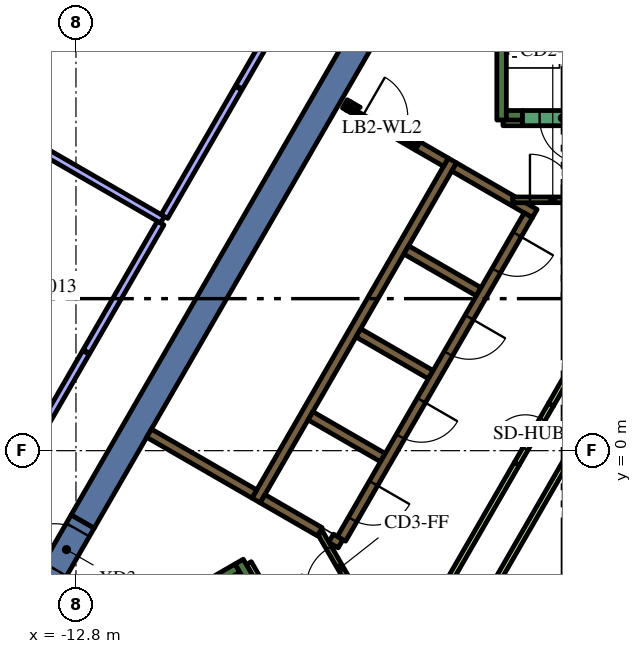
"""IFC4 building model, lengths in metres.
Left out: names, types, materials, properties, quantities, classifications, styles, units other than length and angle.
Written with IfcOpenShell. Run it as: python <this file> out.ifc"""

import sys

from ifc_helpers import new_model, si_unit, direction, frame, frame_2d, origin, place, context, subcontext, project, spatial, polyline, rectangle, outline, extrude, element, fill, save


model = new_model("IFC4")
c1 = context("Model", 3, precision=1e-05, world=origin(), true_north=direction((0.0, 1.0)))
c2 = subcontext(c1, "Body", "Model", "MODEL_VIEW")
j1 = project(units=[si_unit("LENGTHUNIT", "METRE"), si_unit("PLANEANGLEUNIT", "RADIAN")], contexts=[c1])
p1 = place(None, origin())
s1 = spatial("IfcSite", under=j1, at=p1, CompositionType="ELEMENT")
p2 = place(p1, origin())
s2 = spatial("IfcBuilding", under=s1, at=p2, CompositionType="ELEMENT")
p3 = place(p2, frame((0.0, 0.0, 222.6)))
s3 = spatial("IfcBuildingStorey", under=s2, at=p3, CompositionType="ELEMENT", Elevation=222.6)
p4 = place(p3, frame((-13.475, -3.339, 0.0), z_axis=(0.0, 0.0, 1.0), x_axis=(-0.499944726303, -0.866057313716, 0.0)))
e1 = element("IfcWall", 1, at=p4, inside=s3, PredefinedType="SOLIDWALL", context=c2, shape_type="SweptSolid", body=[
    extrude(rectangle(XDim=2.884, YDim=0.7, at=frame_2d((1.442, 0.0))), origin(), (0.0, 0.0, 1.0), 4.2),
])
p5 = place(p3, frame((-12.625, -1.867, 0.0), z_axis=(0.0, 0.0, 1.0), x_axis=(0.500008520515, 0.866020484407, 0.0)))
e2 = element("IfcWall", 2, at=p5, inside=s3, PredefinedType="SOLIDWALL", context=c2, shape_type="SweptSolid", body=[
    extrude(rectangle(XDim=15.859, YDim=0.7, at=frame_2d((7.929, 0.0))), origin(), (0.0, 0.0, 1.0), 4.2),
])
p6 = place(p3, frame((-1.6, 8.7, 0.0), z_axis=(0.0, 0.0, 1.0), x_axis=(0.0, 1.0, 0.0)))
e3 = element("IfcWall", 3, at=p6, inside=s3, PredefinedType="SOLIDWALL", context=c2, shape_type="SweptSolid", body=[
    extrude(rectangle(XDim=7.05, YDim=0.25, at=frame_2d((3.525, 0.0))), origin(), (0.0, 0.0, 1.0), 4.2),
])
p7 = place(p3, frame((-1.475, 8.825, 0.0), z_axis=(0.0, 0.0, 1.0), x_axis=(1.0, 0.0, 0.0)))
e4 = element("IfcWall", 4, at=p7, inside=s3, PredefinedType="SOLIDWALL", context=c2, shape_type="SweptSolid", body=[
    extrude(rectangle(XDim=0.425, YDim=0.25, at=frame_2d((0.212, 0.0))), origin(), (0.0, 0.0, 1.0), 4.2),
])
p8 = place(p3, frame((-14.44, -6.49, 0.0), z_axis=(0.0, 0.0, 1.0), x_axis=(0.866022966069, 0.500004222222, 0.0)))
e5 = element("IfcWall", 5, at=p8, inside=s3, PredefinedType="SOLIDWALL", context=c2, shape_type="SweptSolid", body=[
    extrude(rectangle(XDim=6.8, YDim=0.25, at=frame_2d((3.4, 0.0))), origin(), (0.0, 0.0, 1.0), 4.2),
])
p9 = place(p3, frame((-8.168, -3.503, 0.0), z_axis=(0.0, 0.0, 1.0), x_axis=(-0.499952099219, 0.866053057547, 0.0)))
e6 = element("IfcWall", 6, at=p9, inside=s3, PredefinedType="SOLIDWALL", context=c2, shape_type="SweptSolid", body=[
    extrude(rectangle(XDim=0.675, YDim=0.25, at=frame_2d((0.337, 0.0))), origin(), (0.0, 0.0, 1.0), 4.2),
])
p10 = place(p3, frame((-8.06, -1.311, 0.0), z_axis=(0.0, 0.0, 1.0), x_axis=(0.50000273126, 0.866023826885, 0.0)))
e7 = element("IfcWall", 7, at=p10, inside=s3, PredefinedType="SOLIDWALL", context=c2, shape_type="SweptSolid", body=[
    extrude(rectangle(XDim=10.33, YDim=0.25, at=frame_2d((5.165, 0.0))), origin(), (0.0, 0.0, 1.0), 4.2),
])
p11 = place(p3, origin())
e8 = element("IfcWall", 8, at=p11, inside=s3, PredefinedType="SOLIDWALL", context=c2, shape_type="SweptSolid", body=[
    extrude(outline(polyline([(-2.912, 7.356), (-2.787, 7.573), (-1.232, 6.675), (-1.303, 6.675), (-1.304, 6.675), (-1.304, 6.675), (-1.304, 6.525), (-1.304, 6.525), (-1.303, 6.525), (-0.971, 6.525), (-0.665, 6.348), (-0.79, 6.132), (-1.007, 6.257), (-1.007, 6.257), (-2.912, 7.356)])), origin(), (0.0, 0.0, 1.0), 4.2),
])
for number, where, z_axis, x_axis in (
    (9, (-2.204, 4.182, 0.0), (0.0, 0.0, 1.0), (-0.866, 0.5, 0.0)),
    (10, (-5.369, 3.1, 0.0), (0.0, 0.0, 1.0), (0.866, -0.5, 0.0)),
    (11, (-4.724, -0.182, 0.0), (0.0, 0.0, 1.0), (-0.866, 0.5, 0.0)),
):
    element("IfcWall", number, at=place(p3, frame(where, z_axis=z_axis, x_axis=x_axis)), inside=s3, PredefinedType="SOLIDWALL", context=c2, shape_type="SweptSolid", body=[
        extrude(rectangle(XDim=2.2, YDim=0.25, at=frame_2d((1.1, 0.0))), origin(), (0.0, 0.0, 1.0), 4.2),
    ])
p12 = place(p3, frame((-6.088, -2.305, 0.0), z_axis=(0.0, 0.0, 1.0), x_axis=(0.866059450854, -0.499941024108, 0.0)))
e12 = element("IfcWall", 12, at=p12, inside=s3, PredefinedType="SOLIDWALL", context=c2, shape_type="SweptSolid", body=[
    extrude(rectangle(XDim=0.29, YDim=0.25, at=frame_2d((0.145, 0.0))), origin(), (0.0, 0.0, 1.0), 4.2),
])
p13 = place(p3, frame((-7.889, -1.265, 0.0), z_axis=(0.0, 0.0, 1.0), x_axis=(0.865986741702, -0.500066958712, 0.0)))
e13 = element("IfcWall", 13, at=p13, inside=s3, PredefinedType="SOLIDWALL", context=c2, shape_type="SweptSolid", body=[
    extrude(rectangle(XDim=1.738, YDim=0.25, at=frame_2d((0.869, 0.0))), origin(), (0.0, 0.0, 1.0), 4.2),
])
p14 = place(p3, frame((-8.106, -1.14, 0.0), z_axis=(0.0, 0.0, 1.0), x_axis=(-0.866008981251, 0.500028443584, 0.0)))
e14 = element("IfcWall", 14, at=p14, inside=s3, PredefinedType="SOLIDWALL", context=c2, shape_type="SweptSolid", body=[
    extrude(rectangle(XDim=3.2, YDim=0.25, at=frame_2d((1.6, 0.0))), origin(), (0.0, 0.0, 1.0), 4.2),
])
p15 = place(p3, frame((-5.725, 9.125, 0.0), z_axis=(0.0, 0.0, 1.0), x_axis=(0.866185586049, -0.49972245349, 0.0)))
e15 = element("IfcWall", 15, at=p15, inside=s3, PredefinedType="SOLIDWALL", context=c2, shape_type="SweptSolid", body=[
    extrude(rectangle(XDim=0.11, YDim=0.25, at=frame_2d((0.055, 0.0))), origin(), (0.0, 0.0, 1.0), 4.2),
])
p16 = place(p3, frame((-3.066, 7.59, 0.0), z_axis=(0.0, 0.0, 1.0), x_axis=(-0.866081358704, 0.49990307071, 0.0)))
e16 = element("IfcWall", 16, at=p16, inside=s3, PredefinedType="SOLIDWALL", context=c2, shape_type="SweptSolid", body=[
    extrude(rectangle(XDim=0.858, YDim=0.25, at=frame_2d((0.429, 0.0))), origin(), (0.0, 0.0, 1.0), 4.2),
])
e17 = element("IfcWall", 17, at=p11, inside=s3, PredefinedType="SOLIDWALL", context=c2, shape_type="SweptSolid", body=[
    extrude(outline(polyline([(-3.748, 8.128), (-3.813, 8.015), (-4.027, 8.139), (-4.017, 8.156), (-4.008, 8.173), (-4.0, 8.192), (-3.995, 8.21), (-3.991, 8.23), (-3.99, 8.25), (-3.99, 8.268), (-3.748, 8.128)])), origin(), (0.0, 0.0, 1.0), 4.2),
])
e18 = element("IfcWall", 18, at=p11, inside=s3, PredefinedType="SOLIDWALL", context=c2, shape_type="SweptSolid", body=[
    extrude(outline(polyline([(-5.689, 8.96), (-5.69, 8.961), (-5.565, 9.177), (-5.319, 9.035), (-5.335, 9.026), (-5.351, 9.015), (-5.366, 9.002), (-5.379, 8.988), (-5.392, 8.972), (-5.402, 8.956), (-5.412, 8.939), (-5.629, 9.064), (-5.629, 9.064), (-5.689, 8.96)])), origin(), (0.0, 0.0, 1.0), 4.2),
])
for number, where, z_axis, x_axis in (
    (19, (-8.252, -2.958, 0.0), (0.0, 0.0, 1.0), (0.5, -0.866, 0.0)),
    (20, (-1.564, 8.625, 0.0), (0.0, 0.0, 1.0), (1.0, 0.0, 0.0)),
):
    element("IfcWall", number, at=place(p3, frame(where, z_axis=z_axis, x_axis=x_axis)), inside=s3, PredefinedType="PARTITIONING", context=c2, shape_type="SweptSolid", body=[
        extrude(rectangle(XDim=0.514, YDim=0.15, at=frame_2d((0.257, 0.0))), origin(), (0.0, 0.0, 1.0), 3.45),
    ])
p17 = place(p3, frame((-1.887, -3.718, 0.0), z_axis=(0.0, 0.0, 1.0), x_axis=(0.500005008002, 0.866022512394, 0.0)))
e21 = element("IfcWall", 21, at=p17, inside=s3, PredefinedType="PARTITIONING", context=c2, shape_type="SweptSolid", body=[
    extrude(rectangle(XDim=8.327, YDim=0.15, at=frame_2d((4.164, 0.0))), origin(), (0.0, 0.0, 1.0), 3.45),
])
p18 = place(p3, frame((-3.147, -3.718, 0.0), z_axis=(0.0, 0.0, 1.0), x_axis=(0.500010131483, 0.866019554291, 0.0)))
e22 = element("IfcWall", 22, at=p18, inside=s3, PredefinedType="PARTITIONING", context=c2, shape_type="SweptSolid", body=[
    extrude(rectangle(XDim=3.894, YDim=0.15, at=frame_2d((1.947, 0.0))), origin(), (0.0, 0.0, 1.0), 3.45),
])
p19 = place(p3, frame((-0.3, 1.212, 0.0), z_axis=(0.0, 0.0, 1.0), x_axis=(0.499963101113, 0.866046706318, 0.0)))
e23 = element("IfcWall", 23, at=p19, inside=s3, PredefinedType="PARTITIONING", context=c2, shape_type="SweptSolid", body=[
    extrude(rectangle(XDim=3.893, YDim=0.15, at=frame_2d((1.947, 0.0))), origin(), (0.0, 0.0, 1.0), 3.45),
])
p20 = place(p3, frame((-0.898, 6.194, 0.0), z_axis=(0.0, 0.0, 1.0), x_axis=(-0.499996202215, -0.866027596426, 0.0)))
e24 = element("IfcWall", 24, at=p20, inside=s3, PredefinedType="SOLIDWALL", context=c2, shape_type="SweptSolid", body=[
    extrude(rectangle(XDim=9.83, YDim=0.25, at=frame_2d((4.915, 0.0))), origin(), (0.0, 0.0, 1.0), 4.2),
])
p21 = place(p20, frame((0.585, 0.0, 0.0)))
e25 = element("IfcOpeningElement", 25, at=p21, cuts=e24, PredefinedType="OPENING", context=c2, shape_type="SweptSolid", body=[
    extrude(rectangle(XDim=1.1, YDim=2.1, at=frame_2d((0.55, 1.05))), frame((0.0, 0.135, 0.0), z_axis=(0.0, -1.0, 0.0), x_axis=(1.0, 0.0, 0.0)), (0.0, 0.0, 1.0), 0.27),
])
p22 = place(p20, frame((3.105, 0.0, 0.0)))
e26 = element("IfcOpeningElement", 26, at=p22, cuts=e24, PredefinedType="OPENING", context=c2, shape_type="SweptSolid", body=[
    extrude(rectangle(XDim=1.1, YDim=2.1, at=frame_2d((0.55, 1.05))), frame((0.0, 0.135, 0.0), z_axis=(0.0, -1.0, 0.0), x_axis=(1.0, 0.0, 0.0)), (0.0, 0.0, 1.0), 0.27),
])
p23 = place(p20, frame((5.625, 0.0, 0.0)))
e27 = element("IfcOpeningElement", 27, at=p23, cuts=e24, PredefinedType="OPENING", context=c2, shape_type="SweptSolid", body=[
    extrude(rectangle(XDim=1.1, YDim=2.1, at=frame_2d((0.55, 1.05))), frame((0.0, 0.135, 0.0), z_axis=(0.0, -1.0, 0.0), x_axis=(1.0, 0.0, 0.0)), (0.0, 0.0, 1.0), 0.27),
])
p24 = place(p20, frame((8.145, 0.0, 0.0)))
e28 = element("IfcOpeningElement", 28, at=p24, cuts=e24, PredefinedType="OPENING", context=c2, shape_type="SweptSolid", body=[
    extrude(rectangle(XDim=1.1, YDim=2.1, at=frame_2d((0.55, 1.05))), frame((0.0, 0.135, 0.0), z_axis=(0.0, -1.0, 0.0), x_axis=(1.0, 0.0, 0.0)), (0.0, 0.0, 1.0), 0.27),
])
p25 = place(p3, frame((1.05, 8.75, 0.0), z_axis=(0.0, 0.0, 1.0), x_axis=(-1.0, 0.0, 0.0)))
e29 = element("IfcWall", 29, at=p25, inside=s3, PredefinedType="SOLIDWALL", context=c2, shape_type="SweptSolid", body=[
    extrude(rectangle(XDim=2.1, YDim=0.4, at=frame_2d((1.05, 0.0))), origin(), (0.0, 0.0, 1.0), 4.2),
])
p26 = place(p25, frame((0.45, 0.0, 0.0)))
e30 = element("IfcOpeningElement", 30, at=p26, cuts=e29, PredefinedType="OPENING", context=c2, shape_type="SweptSolid", body=[
    extrude(rectangle(XDim=1.2, YDim=2.1, at=frame_2d((0.6, 1.05))), frame((0.0, 0.21, 0.0), z_axis=(0.0, -1.0, 0.0), x_axis=(1.0, 0.0, 0.0)), (0.0, 0.0, 1.0), 0.42),
])
p27 = place(p3, frame((-1.303, 6.6, 0.0), z_axis=(0.0, 0.0, 1.0), x_axis=(1.0, 0.0, 0.0)))
e31 = element("IfcWall", 31, at=p27, inside=s3, PredefinedType="PARTITIONING", context=c2, shape_type="SweptSolid", body=[
    extrude(rectangle(XDim=2.1, YDim=0.15, at=frame_2d((1.05, 0.0))), origin(), (0.0, 0.0, 1.0), 4.2),
])
p28 = place(p27, frame((0.45, 0.0, 0.0)))
e32 = element("IfcOpeningElement", 32, at=p28, cuts=e31, PredefinedType="OPENING", context=c2, shape_type="SweptSolid", body=[
    extrude(rectangle(XDim=1.2, YDim=2.1, at=frame_2d((0.6, 1.05))), frame((0.0, 0.085, 0.0), z_axis=(0.0, -1.0, 0.0), x_axis=(1.0, 0.0, 0.0)), (0.0, 0.0, 1.0), 0.17),
])
p29 = place(p3, frame((-5.317, -3.99, 0.0), z_axis=(0.0, 0.0, 1.0), x_axis=(-0.500027713859, 0.866009402589, 0.0)))
e33 = element("IfcWall", 33, at=p29, inside=s3, PredefinedType="PARTITIONING", context=c2, shape_type="SweptSolid", body=[
    extrude(rectangle(XDim=2.1, YDim=0.15, at=frame_2d((1.05, 0.0))), origin(), (0.0, 0.0, 1.0), 4.2),
])
p30 = place(p29, frame((0.45, 0.0, 0.0)))
e34 = element("IfcOpeningElement", 34, at=p30, cuts=e33, PredefinedType="OPENING", context=c2, shape_type="SweptSolid", body=[
    extrude(rectangle(XDim=1.2, YDim=2.1, at=frame_2d((0.6, 1.05))), frame((0.0, 0.085, 0.0), z_axis=(0.0, -1.0, 0.0), x_axis=(1.0, 0.0, 0.0)), (0.0, 0.0, 1.0), 0.17),
])
p31 = place(p3, frame((-5.659, 9.012, 0.0), z_axis=(0.0, 0.0, 1.0), x_axis=(0.866009402589, -0.500027713859, 0.0)))
e35 = element("IfcWall", 35, at=p31, inside=s3, PredefinedType="PARTITIONING", context=c2, shape_type="SweptSolid", body=[
    extrude(rectangle(XDim=2.1, YDim=0.12, at=frame_2d((1.05, 0.0))), origin(), (0.0, 0.0, 1.0), 3.45),
])
p32 = place(p31, frame((0.45, 0.0, 0.0)))
e36 = element("IfcOpeningElement", 36, at=p32, cuts=e35, PredefinedType="OPENING", context=c2, shape_type="SweptSolid", body=[
    extrude(rectangle(XDim=1.2, YDim=2.1, at=frame_2d((0.6, 1.05))), frame((0.0, 0.07, 0.0), z_axis=(0.0, -1.0, 0.0), x_axis=(1.0, 0.0, 0.0)), (0.0, 0.0, 1.0), 0.14),
])
p33 = place(p3, frame((-13.475, -3.339, 0.0), z_axis=(0.0, 0.0, 1.0), x_axis=(0.499954529098, 0.86605165483, 0.0)))
e37 = element("IfcWall", 37, at=p33, inside=s3, PredefinedType="SOLIDWALL", context=c2, shape_type="SweptSolid", body=[
    extrude(rectangle(XDim=1.7, YDim=0.7, at=frame_2d((0.85, 0.0))), origin(), (0.0, 0.0, 1.0), 4.2),
])
p34 = place(p33, frame((0.25, 0.0, 0.0)))
e38 = element("IfcOpeningElement", 38, at=p34, cuts=e37, PredefinedType="OPENING", context=c2, shape_type="SweptSolid", body=[
    extrude(rectangle(XDim=1.2, YDim=2.1, at=frame_2d((0.6, 1.05))), frame((0.0, 0.36, 0.0), z_axis=(0.0, -1.0, 0.0), x_axis=(1.0, 0.0, 0.0)), (0.0, 0.0, 1.0), 0.72),
])
p35 = place(p3, frame((-1.2, -0.346, 0.0), z_axis=(0.0, 0.0, 1.0), x_axis=(0.499961193289, 0.866047807691, 0.0)))
e39 = element("IfcWall", 39, at=p35, inside=s3, PredefinedType="PARTITIONING", context=c2, shape_type="SweptSolid", body=[
    extrude(rectangle(XDim=1.8, YDim=0.15, at=frame_2d((0.9, 0.0))), origin(), (0.0, 0.0, 1.0), 3.45),
])
p36 = place(p35, frame((0.45, 0.0, 0.0)))
e40 = element("IfcOpeningElement", 40, at=p36, cuts=e39, PredefinedType="OPENING", context=c2, shape_type="SweptSolid", body=[
    extrude(rectangle(XDim=0.9, YDim=2.1, at=frame_2d((0.45, 1.05))), frame((0.0, 0.085, 0.0), z_axis=(0.0, -1.0, 0.0), x_axis=(1.0, 0.0, 0.0)), (0.0, 0.0, 1.0), 0.17),
])
p37 = place(p3, frame((-10.522, 6.075, 0.0), z_axis=(0.0, 0.0, 1.0), x_axis=(-0.866002601515, 0.500039492609, 0.0)))
e41 = element("IfcWall", 41, at=p37, inside=s3, PredefinedType="PARTITIONING", context=c2, shape_type="SweptSolid", body=[
    extrude(rectangle(XDim=3.844, YDim=0.2, at=frame_2d((1.922, 0.0))), origin(), (0.0, 0.0, 1.0), 3.45),
])
p38 = place(p3, frame((-8.522, 9.539, 0.0), z_axis=(0.0, 0.0, 1.0), x_axis=(-0.499997012787, -0.866027128446, 0.0)))
e42 = element("IfcWall", 42, at=p38, inside=s3, PredefinedType="PARTITIONING", context=c2, shape_type="SweptSolid", body=[
    extrude(rectangle(XDim=3.9, YDim=0.2, at=frame_2d((1.95, 0.0))), origin(), (0.0, 0.0, 1.0), 3.45),
])
p39 = place(p3, frame((-5.75, 14.341, 0.0), z_axis=(0.0, 0.0, 1.0), x_axis=(-0.499995817524, -0.866027818524, 0.0)))
e43 = element("IfcWall", 43, at=p39, inside=s3, PredefinedType="PARTITIONING", context=c2, shape_type="SweptSolid", body=[
    extrude(rectangle(XDim=5.515, YDim=0.2, at=frame_2d((2.757, 0.0))), origin(), (0.0, 0.0, 1.0), 3.45),
])
p40 = place(p3, frame((-10.572, 5.988, 0.0), z_axis=(0.0, 0.0, 1.0), x_axis=(-0.499997012787, -0.866027128446, 0.0)))
e44 = element("IfcWall", 44, at=p40, inside=s3, PredefinedType="PARTITIONING", context=c2, shape_type="SweptSolid", body=[
    extrude(rectangle(XDim=3.9, YDim=0.2, at=frame_2d((1.95, 0.0))), origin(), (0.0, 0.0, 1.0), 3.45),
])
p41 = place(p3, frame((-12.537, 2.585, 0.0), z_axis=(0.0, 0.0, 1.0), x_axis=(-0.500002393198, -0.866024022066, 0.0)))
e45 = element("IfcWall", 45, at=p41, inside=s3, PredefinedType="PARTITIONING", context=c2, shape_type="SweptSolid", body=[
    extrude(rectangle(XDim=10.317, YDim=0.2, at=frame_2d((5.159, 0.0))), origin(), (0.0, 0.0, 1.0), 3.45),
])
p42 = place(p41, frame((4.7, 0.0, 0.0)))
e46 = element("IfcOpeningElement", 46, at=p42, cuts=e45, PredefinedType="OPENING", context=c2, shape_type="SweptSolid", body=[
    extrude(rectangle(XDim=1.0, YDim=2.1, at=frame_2d((0.5, 1.05))), frame((0.0, 0.11, 0.0), z_axis=(0.0, -1.0, 0.0), x_axis=(1.0, 0.0, 0.0)), (0.0, 0.0, 1.0), 0.22),
])
p43 = place(p21, origin())
e47 = element("IfcDoor", 47, at=p43, inside=s3, OperationType="DOUBLE_DOOR_SLIDING", PredefinedType="DOOR", context=c2, shape_type="SweptSolid", body=[
    extrude(rectangle(XDim=1.1, YDim=2.1, at=frame_2d((0.55, 1.05))), frame((0.0, 0.025, 0.0), z_axis=(0.0, -1.0, 0.0), x_axis=(1.0, 0.0, 0.0)), (0.0, 0.0, 1.0), 0.05),
])
fill(e25, e47)
p44 = place(p22, origin())
e48 = element("IfcDoor", 48, at=p44, inside=s3, OperationType="DOUBLE_DOOR_SLIDING", PredefinedType="DOOR", context=c2, shape_type="SweptSolid", body=[
    extrude(rectangle(XDim=1.1, YDim=2.1, at=frame_2d((0.55, 1.05))), frame((0.0, 0.025, 0.0), z_axis=(0.0, -1.0, 0.0), x_axis=(1.0, 0.0, 0.0)), (0.0, 0.0, 1.0), 0.05),
])
fill(e26, e48)
p45 = place(p23, origin())
e49 = element("IfcDoor", 49, at=p45, inside=s3, OperationType="DOUBLE_DOOR_SLIDING", PredefinedType="DOOR", context=c2, shape_type="SweptSolid", body=[
    extrude(rectangle(XDim=1.1, YDim=2.1, at=frame_2d((0.55, 1.05))), frame((0.0, 0.025, 0.0), z_axis=(0.0, -1.0, 0.0), x_axis=(1.0, 0.0, 0.0)), (0.0, 0.0, 1.0), 0.05),
])
fill(e27, e49)
p46 = place(p24, origin())
e50 = element("IfcDoor", 50, at=p46, inside=s3, OperationType="DOUBLE_DOOR_SLIDING", PredefinedType="DOOR", context=c2, shape_type="SweptSolid", body=[
    extrude(rectangle(XDim=1.1, YDim=2.1, at=frame_2d((0.55, 1.05))), frame((0.0, 0.025, 0.0), z_axis=(0.0, -1.0, 0.0), x_axis=(1.0, 0.0, 0.0)), (0.0, 0.0, 1.0), 0.05),
])
fill(e28, e50)
p47 = place(p26, origin())
e51 = element("IfcDoor", 51, at=p47, inside=s3, OperationType="SINGLE_SWING_LEFT", PredefinedType="DOOR", context=c2, shape_type="SweptSolid", body=[
    extrude(rectangle(XDim=1.2, YDim=2.1, at=frame_2d((0.6, 1.05))), frame((0.0, 0.025, 0.0), z_axis=(0.0, -1.0, 0.0), x_axis=(1.0, 0.0, 0.0)), (0.0, 0.0, 1.0), 0.05),
])
fill(e30, e51)
p48 = place(p28, origin())
e52 = element("IfcDoor", 52, at=p48, inside=s3, OperationType="SINGLE_SWING_LEFT", PredefinedType="DOOR", context=c2, shape_type="SweptSolid", body=[
    extrude(rectangle(XDim=1.2, YDim=2.1, at=frame_2d((0.6, 1.05))), frame((0.0, 0.025, 0.0), z_axis=(0.0, -1.0, 0.0), x_axis=(1.0, 0.0, 0.0)), (0.0, 0.0, 1.0), 0.05),
])
fill(e32, e52)
p49 = place(p30, origin())
e53 = element("IfcDoor", 53, at=p49, inside=s3, OperationType="SINGLE_SWING_LEFT", PredefinedType="DOOR", context=c2, shape_type="SweptSolid", body=[
    extrude(rectangle(XDim=1.2, YDim=2.1, at=frame_2d((0.6, 1.05))), frame((0.0, 0.025, 0.0), z_axis=(0.0, -1.0, 0.0), x_axis=(1.0, 0.0, 0.0)), (0.0, 0.0, 1.0), 0.05),
])
fill(e34, e53)
p50 = place(p32, origin())
e54 = element("IfcDoor", 54, at=p50, inside=s3, OperationType="SINGLE_SWING_LEFT", PredefinedType="DOOR", context=c2, shape_type="SweptSolid", body=[
    extrude(rectangle(XDim=1.2, YDim=2.1, at=frame_2d((0.6, 1.05))), frame((0.0, 0.025, 0.0), z_axis=(0.0, -1.0, 0.0), x_axis=(1.0, 0.0, 0.0)), (0.0, 0.0, 1.0), 0.05),
])
fill(e36, e54)
p51 = place(p34, origin())
e55 = element("IfcDoor", 55, at=p51, inside=s3, OperationType="SINGLE_SWING_LEFT", PredefinedType="DOOR", context=c2, shape_type="SweptSolid", body=[
    extrude(rectangle(XDim=1.2, YDim=2.1, at=frame_2d((0.6, 1.05))), frame((0.0, 0.025, 0.0), z_axis=(0.0, -1.0, 0.0), x_axis=(1.0, 0.0, 0.0)), (0.0, 0.0, 1.0), 0.05),
])
fill(e38, e55)
p52 = place(p36, origin())
e56 = element("IfcDoor", 56, at=p52, inside=s3, OperationType="SINGLE_SWING_LEFT", PredefinedType="DOOR", context=c2, shape_type="SweptSolid", body=[
    extrude(rectangle(XDim=0.9, YDim=2.1, at=frame_2d((0.45, 1.05))), frame((0.0, 0.025, 0.0), z_axis=(0.0, -1.0, 0.0), x_axis=(1.0, 0.0, 0.0)), (0.0, 0.0, 1.0), 0.05),
])
fill(e40, e56)
save(model, sys.argv[1])
